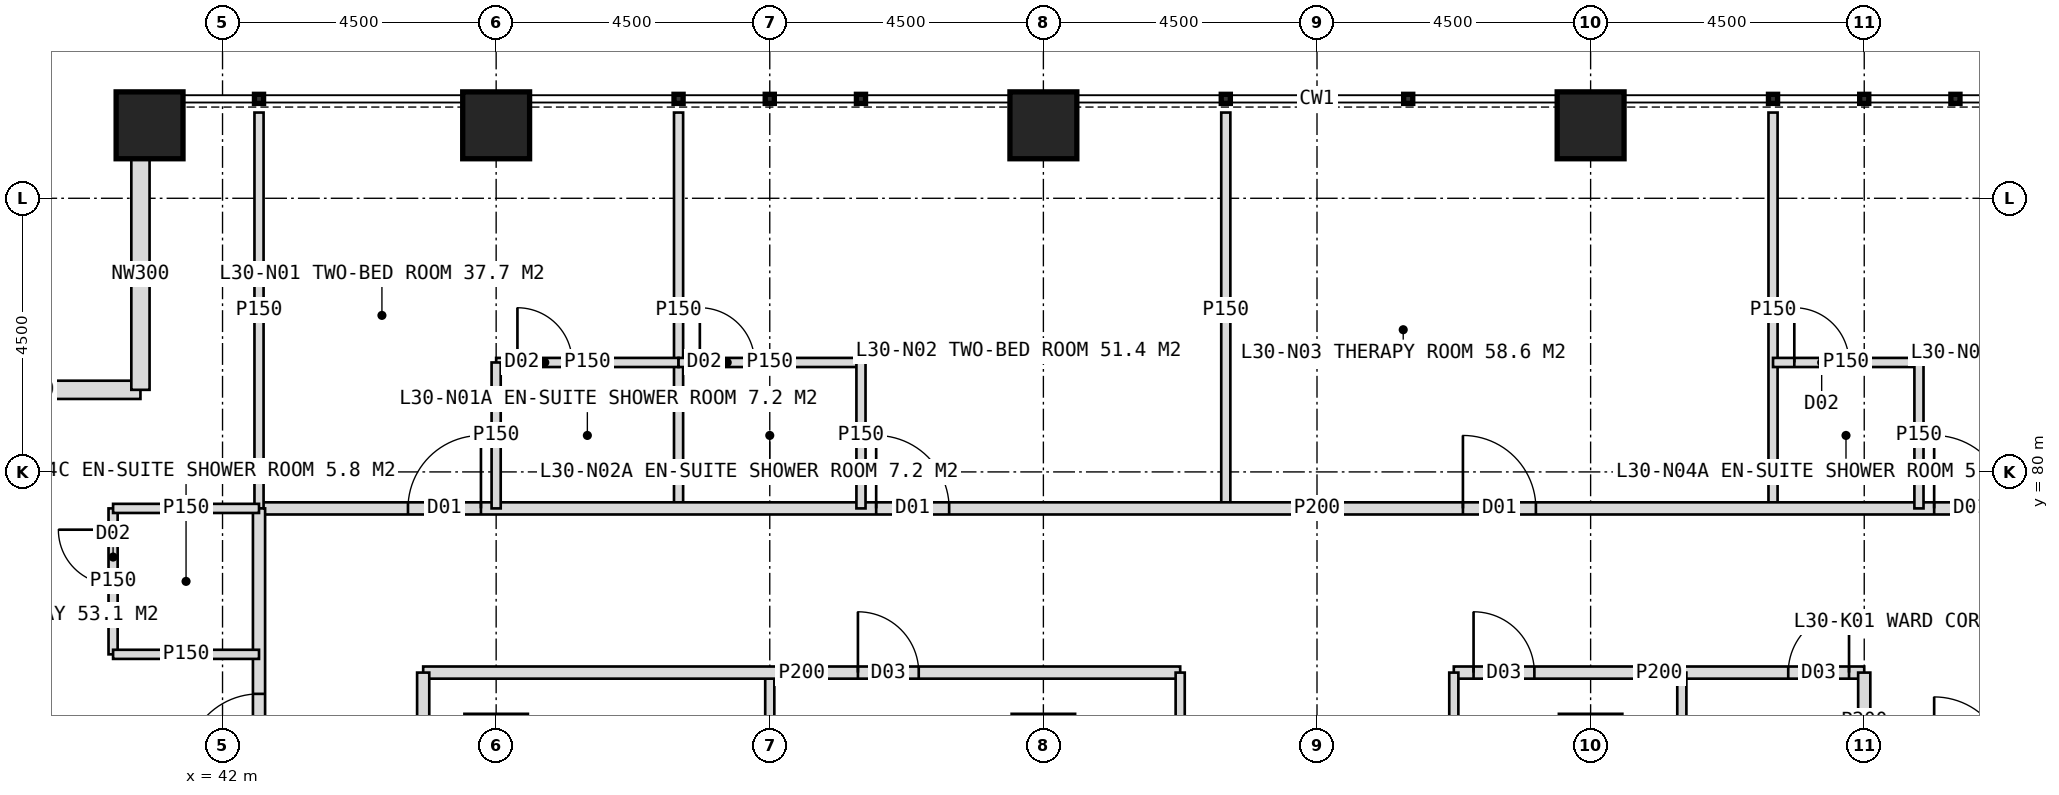
"""IFC4 building model, lengths in metres.
Left out: names, types, materials, properties, quantities, classifications, styles, units other than length and angle.
Written with IfcOpenShell. Run it as: python <this file> out.ifc"""

import sys

from ifc_helpers import new_model, si_unit, direction, frame, frame_2d, origin, origin_2d, place, context, subcontext, project, spatial, rectangle, hollow_rectangle, extrude, element, fill, save


model = new_model("IFC4")
c1 = context("Model", 3, precision=1e-05, world=origin(), true_north=direction((0.0, 1.0)))
c2 = subcontext(c1, "Body", "Model", "MODEL_VIEW")
j1 = project(units=[si_unit("LENGTHUNIT", "METRE"), si_unit("PLANEANGLEUNIT", "RADIAN")], contexts=[c1])
p1 = place(None, origin())
s1 = spatial("IfcSite", under=j1, at=p1, CompositionType="ELEMENT")
p2 = place(p1, origin())
s2 = spatial("IfcBuilding", under=s1, at=p2, CompositionType="ELEMENT")
p3 = place(p2, frame((0.0, 0.0, 128.0)))
s3 = spatial("IfcBuildingStorey", under=s2, at=p3, CompositionType="ELEMENT", Elevation=128.0)
for number, where, z_axis, x_axis in (
    (1, (40.8, 85.7, 0.0), (0.0, 0.0, 1.0), (1.0, 0.0, 0.0)),
    (2, (46.5, 85.7, 0.0), (0.0, 0.0, 1.0), (1.0, 0.0, 0.0)),
    (3, (55.5, 85.7, 0.0), (0.0, 0.0, 1.0), (1.0, 0.0, 0.0)),
    (4, (64.5, 85.7, 0.0), (0.0, 0.0, 1.0), (1.0, 0.0, 0.0)),
):
    element("IfcColumn", number, at=place(p3, frame(where, z_axis=z_axis, x_axis=x_axis)), inside=s3, PredefinedType="COLUMN", context=c2, shape_type="SweptSolid", body=[
        extrude(hollow_rectangle(XDim=1.1, YDim=1.1, WallThickness=0.1, at=origin_2d()), origin(), (0.0, 0.0, 1.0), 4.0),
    ])
for number, where, z_axis, x_axis in (
    (5, (36.85, 81.35, 0.0), (0.0, 0.0, 1.0), (1.0, 0.0, 0.0)),
    (6, (40.65, 81.35, 0.0), (0.0, 0.0, 1.0), (0.0, 1.0, 0.0)),
):
    element("IfcWall", number, at=place(p3, frame(where, z_axis=z_axis, x_axis=x_axis)), inside=s3, PredefinedType="ELEMENTEDWALL", context=c2, shape_type="SweptSolid", body=[
        extrude(rectangle(XDim=3.8, YDim=0.3, at=frame_2d((1.9, 0.0))), origin(), (0.0, 0.0, 1.0), 4.0),
    ])
for number, where, z_axis, x_axis in (
    (7, (49.5, 79.4, 0.0), (0.0, 0.0, 1.0), (0.0, 1.0, 0.0)),
    (8, (58.5, 79.4, 0.0), (0.0, 0.0, 1.0), (0.0, 1.0, 0.0)),
    (9, (67.5, 79.4, 0.0), (0.0, 0.0, 1.0), (0.0, 1.0, 0.0)),
):
    element("IfcWall", number, at=place(p3, frame(where, z_axis=z_axis, x_axis=x_axis)), inside=s3, PredefinedType="PARTITIONING", context=c2, shape_type="SweptSolid", body=[
        extrude(rectangle(XDim=6.51, YDim=0.15, at=frame_2d((3.255, 0.0))), origin(), (0.0, 0.0, 1.0), 3.75),
    ])
p4 = place(p3, frame((42.6, 79.4, 0.0), z_axis=(0.0, 0.0, 1.0), x_axis=(1.0, 0.0, 0.0)))
e10 = element("IfcWall", 10, at=p4, inside=s3, PredefinedType="PARTITIONING", context=c2, shape_type="SweptSolid", body=[
    extrude(rectangle(XDim=34.8, YDim=0.2, at=frame_2d((17.4, 0.0))), origin(), (0.0, 0.0, 1.0), 3.75),
])
p5 = place(p4, frame((2.45, 0.0, 0.0)))
e11 = element("IfcOpeningElement", 11, at=p5, cuts=e10, PredefinedType="OPENING", context=c2, shape_type="SweptSolid", body=[
    extrude(rectangle(XDim=1.2, YDim=2.2, at=frame_2d((0.6, 1.1))), frame((0.0, 0.11, 0.0), z_axis=(0.0, -1.0, 0.0), x_axis=(1.0, 0.0, 0.0)), (0.0, 0.0, 1.0), 0.22),
])
p6 = place(p4, frame((10.15, 0.0, 0.0)))
e12 = element("IfcOpeningElement", 12, at=p6, cuts=e10, PredefinedType="OPENING", context=c2, shape_type="SweptSolid", body=[
    extrude(rectangle(XDim=1.2, YDim=2.2, at=frame_2d((0.6, 1.1))), frame((0.0, 0.11, 0.0), z_axis=(0.0, -1.0, 0.0), x_axis=(1.0, 0.0, 0.0)), (0.0, 0.0, 1.0), 0.22),
])
p7 = place(p4, frame((19.8, 0.0, 0.0)))
e13 = element("IfcOpeningElement", 13, at=p7, cuts=e10, PredefinedType="OPENING", context=c2, shape_type="SweptSolid", body=[
    extrude(rectangle(XDim=1.2, YDim=2.2, at=frame_2d((0.6, 1.1))), frame((0.0, 0.11, 0.0), z_axis=(0.0, -1.0, 0.0), x_axis=(1.0, 0.0, 0.0)), (0.0, 0.0, 1.0), 0.22),
])
p8 = place(p4, frame((27.55, 0.0, 0.0)))
e14 = element("IfcOpeningElement", 14, at=p8, cuts=e10, PredefinedType="OPENING", context=c2, shape_type="SweptSolid", body=[
    extrude(rectangle(XDim=1.2, YDim=2.2, at=frame_2d((0.6, 1.1))), frame((0.0, 0.11, 0.0), z_axis=(0.0, -1.0, 0.0), x_axis=(1.0, 0.0, 0.0)), (0.0, 0.0, 1.0), 0.22),
])
p9 = place(p3, frame((42.6, 79.4, 0.0), z_axis=(0.0, 0.0, 1.0), x_axis=(0.0, 1.0, 0.0)))
e15 = element("IfcWall", 15, at=p9, inside=s3, PredefinedType="PARTITIONING", context=c2, shape_type="SweptSolid", body=[
    extrude(rectangle(XDim=6.51, YDim=0.15, at=frame_2d((3.255, 0.0))), origin(), (0.0, 0.0, 1.0), 3.75),
])
p10 = place(p3, frame((46.5, 81.8, 0.0), z_axis=(0.0, 0.0, 1.0), x_axis=(1.0, 0.0, 0.0)))
e16 = element("IfcWall", 16, at=p10, inside=s3, PredefinedType="PARTITIONING", context=c2, shape_type="SweptSolid", body=[
    extrude(rectangle(XDim=3.0, YDim=0.15, at=frame_2d((1.5, 0.0))), origin(), (0.0, 0.0, 1.0), 3.75),
])
p11 = place(p10, frame((0.35, 0.0, 0.0)))
e17 = element("IfcOpeningElement", 17, at=p11, cuts=e16, PredefinedType="OPENING", context=c2, shape_type="SweptSolid", body=[
    extrude(rectangle(XDim=0.9, YDim=2.1, at=frame_2d((0.45, 1.05))), frame((0.0, 0.085, 0.0), z_axis=(0.0, -1.0, 0.0), x_axis=(1.0, 0.0, 0.0)), (0.0, 0.0, 1.0), 0.17),
])
p12 = place(p3, frame((46.5, 79.4, 0.0), z_axis=(0.0, 0.0, 1.0), x_axis=(0.0, 1.0, 0.0)))
e18 = element("IfcWall", 18, at=p12, inside=s3, PredefinedType="PARTITIONING", context=c2, shape_type="SweptSolid", body=[
    extrude(rectangle(XDim=2.4, YDim=0.15, at=frame_2d((1.2, 0.0))), origin(), (0.0, 0.0, 1.0), 2.95),
])
p13 = place(p3, frame((49.5, 81.8, 0.0), z_axis=(0.0, 0.0, 1.0), x_axis=(1.0, 0.0, 0.0)))
e19 = element("IfcWall", 19, at=p13, inside=s3, PredefinedType="PARTITIONING", context=c2, shape_type="SweptSolid", body=[
    extrude(rectangle(XDim=3.0, YDim=0.15, at=frame_2d((1.5, 0.0))), origin(), (0.0, 0.0, 1.0), 3.75),
])
p14 = place(p13, frame((0.35, 0.0, 0.0)))
e20 = element("IfcOpeningElement", 20, at=p14, cuts=e19, PredefinedType="OPENING", context=c2, shape_type="SweptSolid", body=[
    extrude(rectangle(XDim=0.9, YDim=2.1, at=frame_2d((0.45, 1.05))), frame((0.0, 0.085, 0.0), z_axis=(0.0, -1.0, 0.0), x_axis=(1.0, 0.0, 0.0)), (0.0, 0.0, 1.0), 0.17),
])
p15 = place(p3, frame((52.5, 79.4, 0.0), z_axis=(0.0, 0.0, 1.0), x_axis=(0.0, 1.0, 0.0)))
e21 = element("IfcWall", 21, at=p15, inside=s3, PredefinedType="PARTITIONING", context=c2, shape_type="SweptSolid", body=[
    extrude(rectangle(XDim=2.4, YDim=0.15, at=frame_2d((1.2, 0.0))), origin(), (0.0, 0.0, 1.0), 3.75),
])
p16 = place(p3, frame((67.5, 81.8, 0.0), z_axis=(0.0, 0.0, 1.0), x_axis=(1.0, 0.0, 0.0)))
e22 = element("IfcWall", 22, at=p16, inside=s3, PredefinedType="PARTITIONING", context=c2, shape_type="SweptSolid", body=[
    extrude(rectangle(XDim=2.4, YDim=0.15, at=frame_2d((1.2, 0.0))), origin(), (0.0, 0.0, 1.0), 3.75),
])
p17 = place(p16, frame((0.35, 0.0, 0.0)))
e23 = element("IfcOpeningElement", 23, at=p17, cuts=e22, PredefinedType="OPENING", context=c2, shape_type="SweptSolid", body=[
    extrude(rectangle(XDim=0.9, YDim=2.1, at=frame_2d((0.45, 1.05))), frame((0.0, 0.085, 0.0), z_axis=(0.0, -1.0, 0.0), x_axis=(1.0, 0.0, 0.0)), (0.0, 0.0, 1.0), 0.17),
])
p18 = place(p3, frame((69.9, 79.4, 0.0), z_axis=(0.0, 0.0, 1.0), x_axis=(0.0, 1.0, 0.0)))
e24 = element("IfcWall", 24, at=p18, inside=s3, PredefinedType="PARTITIONING", context=c2, shape_type="SweptSolid", body=[
    extrude(rectangle(XDim=2.4, YDim=0.15, at=frame_2d((1.2, 0.0))), origin(), (0.0, 0.0, 1.0), 3.75),
])
p19 = place(p3, frame((51.0, 71.0, 0.0), z_axis=(0.0, 0.0, 1.0), x_axis=(0.0, 1.0, 0.0)))
e25 = element("IfcWall", 25, at=p19, inside=s3, PredefinedType="PARTITIONING", context=c2, shape_type="SweptSolid", body=[
    extrude(rectangle(XDim=5.7, YDim=0.15, at=frame_2d((2.85, 0.0))), origin(), (0.0, 0.0, 1.0), 3.75),
])
p20 = place(p3, frame((45.3, 76.7, 0.0), z_axis=(0.0, 0.0, 1.0), x_axis=(1.0, 0.0, 0.0)))
e26 = element("IfcWall", 26, at=p20, inside=s3, PredefinedType="PARTITIONING", context=c2, shape_type="SweptSolid", body=[
    extrude(rectangle(XDim=12.45, YDim=0.2, at=frame_2d((6.225, 0.0))), origin(), (0.0, 0.0, 1.0), 3.75),
])
p21 = place(p20, frame((7.15, 0.0, 0.0)))
e27 = element("IfcOpeningElement", 27, at=p21, cuts=e26, PredefinedType="OPENING", context=c2, shape_type="SweptSolid", body=[
    extrude(rectangle(XDim=1.0, YDim=2.1, at=frame_2d((0.5, 1.05))), frame((0.0, 0.11, 0.0), z_axis=(0.0, -1.0, 0.0), x_axis=(1.0, 0.0, 0.0)), (0.0, 0.0, 1.0), 0.22),
])
p22 = place(p3, frame((62.25, 76.7, 0.0), z_axis=(0.0, 0.0, 1.0), x_axis=(1.0, 0.0, 0.0)))
e28 = element("IfcWall", 28, at=p22, inside=s3, PredefinedType="PARTITIONING", context=c2, shape_type="SweptSolid", body=[
    extrude(rectangle(XDim=6.75, YDim=0.2, at=frame_2d((3.375, 0.0))), origin(), (0.0, 0.0, 1.0), 3.75),
])
p23 = place(p22, frame((0.325, 0.0, 0.0)))
e29 = element("IfcOpeningElement", 29, at=p23, cuts=e28, PredefinedType="OPENING", context=c2, shape_type="SweptSolid", body=[
    extrude(rectangle(XDim=1.0, YDim=2.1, at=frame_2d((0.5, 1.05))), frame((0.0, 0.11, 0.0), z_axis=(0.0, -1.0, 0.0), x_axis=(1.0, 0.0, 0.0)), (0.0, 0.0, 1.0), 0.22),
])
p24 = place(p22, frame((5.5, 0.0, 0.0)))
e30 = element("IfcOpeningElement", 30, at=p24, cuts=e28, PredefinedType="OPENING", context=c2, shape_type="SweptSolid", body=[
    extrude(rectangle(XDim=1.0, YDim=2.1, at=frame_2d((0.5, 1.05))), frame((0.0, 0.11, 0.0), z_axis=(0.0, -1.0, 0.0), x_axis=(1.0, 0.0, 0.0)), (0.0, 0.0, 1.0), 0.22),
])
p25 = place(p3, frame((57.75, 71.0, 0.0), z_axis=(0.0, 0.0, 1.0), x_axis=(0.0, 1.0, 0.0)))
e31 = element("IfcWall", 31, at=p25, inside=s3, PredefinedType="PARTITIONING", context=c2, shape_type="SweptSolid", body=[
    extrude(rectangle(XDim=5.7, YDim=0.15, at=frame_2d((2.85, 0.0))), origin(), (0.0, 0.0, 1.0), 3.75),
])
p26 = place(p25, frame((0.6, 0.0, 0.0)))
e32 = element("IfcOpeningElement", 32, at=p26, cuts=e31, PredefinedType="OPENING", context=c2, shape_type="SweptSolid", body=[
    extrude(rectangle(XDim=0.9, YDim=2.1, at=frame_2d((0.45, 1.05))), frame((0.0, 0.085, 0.0), z_axis=(0.0, -1.0, 0.0), x_axis=(1.0, 0.0, 0.0)), (0.0, 0.0, 1.0), 0.17),
])
p27 = place(p3, frame((62.25, 71.0, 0.0), z_axis=(0.0, 0.0, 1.0), x_axis=(0.0, 1.0, 0.0)))
e33 = element("IfcWall", 33, at=p27, inside=s3, PredefinedType="PARTITIONING", context=c2, shape_type="SweptSolid", body=[
    extrude(rectangle(XDim=5.7, YDim=0.15, at=frame_2d((2.85, 0.0))), origin(), (0.0, 0.0, 1.0), 3.75),
])
p28 = place(p27, frame((0.6, 0.0, 0.0)))
e34 = element("IfcOpeningElement", 34, at=p28, cuts=e33, PredefinedType="OPENING", context=c2, shape_type="SweptSolid", body=[
    extrude(rectangle(XDim=0.9, YDim=2.1, at=frame_2d((0.45, 1.05))), frame((0.0, 0.085, 0.0), z_axis=(0.0, -1.0, 0.0), x_axis=(1.0, 0.0, 0.0)), (0.0, 0.0, 1.0), 0.17),
])
p29 = place(p3, frame((66.0, 71.0, 0.0), z_axis=(0.0, 0.0, 1.0), x_axis=(0.0, 1.0, 0.0)))
e35 = element("IfcWall", 35, at=p29, inside=s3, PredefinedType="PARTITIONING", context=c2, shape_type="SweptSolid", body=[
    extrude(rectangle(XDim=5.7, YDim=0.15, at=frame_2d((2.85, 0.0))), origin(), (0.0, 0.0, 1.0), 3.75),
])
p30 = place(p3, frame((42.6, 44.6, 0.0), z_axis=(0.0, 0.0, 1.0), x_axis=(0.0, 1.0, 0.0)))
e36 = element("IfcWall", 36, at=p30, inside=s3, PredefinedType="PARTITIONING", context=c2, shape_type="SweptSolid", body=[
    extrude(rectangle(XDim=34.8, YDim=0.2, at=frame_2d((17.4, 0.0))), origin(), (0.0, 0.0, 1.0), 3.75),
])
p31 = place(p30, frame((2.45, 0.0, 0.0)))
e37 = element("IfcOpeningElement", 37, at=p31, cuts=e36, PredefinedType="OPENING", context=c2, shape_type="SweptSolid", body=[
    extrude(rectangle(XDim=1.2, YDim=2.2, at=frame_2d((0.6, 1.1))), frame((0.0, 0.11, 0.0), z_axis=(0.0, -1.0, 0.0), x_axis=(1.0, 0.0, 0.0)), (0.0, 0.0, 1.0), 0.22),
])
p32 = place(p30, frame((10.15, 0.0, 0.0)))
e38 = element("IfcOpeningElement", 38, at=p32, cuts=e36, PredefinedType="OPENING", context=c2, shape_type="SweptSolid", body=[
    extrude(rectangle(XDim=1.2, YDim=2.2, at=frame_2d((0.6, 1.1))), frame((0.0, 0.11, 0.0), z_axis=(0.0, -1.0, 0.0), x_axis=(1.0, 0.0, 0.0)), (0.0, 0.0, 1.0), 0.22),
])
p33 = place(p30, frame((23.45, 0.0, 0.0)))
e39 = element("IfcOpeningElement", 39, at=p33, cuts=e36, PredefinedType="OPENING", context=c2, shape_type="SweptSolid", body=[
    extrude(rectangle(XDim=1.2, YDim=2.2, at=frame_2d((0.6, 1.1))), frame((0.0, 0.11, 0.0), z_axis=(0.0, -1.0, 0.0), x_axis=(1.0, 0.0, 0.0)), (0.0, 0.0, 1.0), 0.22),
])
p34 = place(p30, frame((30.55, 0.0, 0.0)))
e40 = element("IfcOpeningElement", 40, at=p34, cuts=e36, PredefinedType="OPENING", context=c2, shape_type="SweptSolid", body=[
    extrude(rectangle(XDim=1.2, YDim=2.2, at=frame_2d((0.6, 1.1))), frame((0.0, 0.11, 0.0), z_axis=(0.0, -1.0, 0.0), x_axis=(1.0, 0.0, 0.0)), (0.0, 0.0, 1.0), 0.22),
])
p35 = place(p3, frame((40.2, 77.0, 0.0), z_axis=(0.0, 0.0, 1.0), x_axis=(0.0, 1.0, 0.0)))
e41 = element("IfcWall", 41, at=p35, inside=s3, PredefinedType="PARTITIONING", context=c2, shape_type="SweptSolid", body=[
    extrude(rectangle(XDim=2.4, YDim=0.15, at=frame_2d((1.2, 0.0))), origin(), (0.0, 0.0, 1.0), 3.75),
])
p36 = place(p35, frame((1.15, 0.0, 0.0)))
e42 = element("IfcOpeningElement", 42, at=p36, cuts=e41, PredefinedType="OPENING", context=c2, shape_type="SweptSolid", body=[
    extrude(rectangle(XDim=0.9, YDim=2.1, at=frame_2d((0.45, 1.05))), frame((0.0, 0.085, 0.0), z_axis=(0.0, -1.0, 0.0), x_axis=(1.0, 0.0, 0.0)), (0.0, 0.0, 1.0), 0.17),
])
for number, where, z_axis, x_axis in (
    (43, (42.6, 77.0, 0.0), (0.0, 0.0, 1.0), (-1.0, 0.0, 0.0)),
    (44, (42.6, 79.4, 0.0), (0.0, 0.0, 1.0), (-1.0, 0.0, 0.0)),
):
    element("IfcWall", number, at=place(p3, frame(where, z_axis=z_axis, x_axis=x_axis)), inside=s3, PredefinedType="PARTITIONING", context=c2, shape_type="SweptSolid", body=[
        extrude(rectangle(XDim=2.4, YDim=0.15, at=frame_2d((1.2, 0.0))), origin(), (0.0, 0.0, 1.0), 3.75),
    ])
p37 = place(p3, frame((45.3, 62.0, 0.0), z_axis=(0.0, 0.0, 1.0), x_axis=(0.0, 1.0, 0.0)))
e45 = element("IfcWall", 45, at=p37, inside=s3, PredefinedType="PARTITIONING", context=c2, shape_type="SweptSolid", body=[
    extrude(rectangle(XDim=14.7, YDim=0.2, at=frame_2d((7.35, 0.0))), origin(), (0.0, 0.0, 1.0), 3.75),
])
p38 = place(p37, frame((1.45, 0.0, 0.0)))
e46 = element("IfcOpeningElement", 46, at=p38, cuts=e45, PredefinedType="OPENING", context=c2, shape_type="SweptSolid", body=[
    extrude(rectangle(XDim=1.0, YDim=2.1, at=frame_2d((0.5, 1.05))), frame((0.0, 0.11, 0.0), z_axis=(0.0, -1.0, 0.0), x_axis=(1.0, 0.0, 0.0)), (0.0, 0.0, 1.0), 0.22),
])
p39 = place(p37, frame((11.35, 0.0, 0.0)))
e47 = element("IfcOpeningElement", 47, at=p39, cuts=e45, PredefinedType="OPENING", context=c2, shape_type="SweptSolid", body=[
    extrude(rectangle(XDim=1.0, YDim=2.1, at=frame_2d((0.5, 1.05))), frame((0.0, 0.11, 0.0), z_axis=(0.0, -1.0, 0.0), x_axis=(1.0, 0.0, 0.0)), (0.0, 0.0, 1.0), 0.22),
])
p40 = place(p3, frame((69.0, 75.1, 0.0), z_axis=(0.0, 0.0, 1.0), x_axis=(0.0, 1.0, 0.0)))
e48 = element("IfcWall", 48, at=p40, inside=s3, PredefinedType="PARTITIONING", context=c2, shape_type="SweptSolid", body=[
    extrude(rectangle(XDim=1.6, YDim=0.2, at=frame_2d((0.8, 0.0))), origin(), (0.0, 0.0, 1.0), 3.75),
])
p41 = place(p5, origin())
e49 = element("IfcDoor", 49, at=p41, inside=s3, OperationType="SINGLE_SWING_RIGHT", PredefinedType="DOOR", context=c2, shape_type="SweptSolid", body=[
    extrude(rectangle(XDim=1.2, YDim=2.2, at=frame_2d((0.6, 1.1))), frame((0.0, 0.025, 0.0), z_axis=(0.0, -1.0, 0.0), x_axis=(1.0, 0.0, 0.0)), (0.0, 0.0, 1.0), 0.05),
])
fill(e11, e49)
p42 = place(p11, origin())
e50 = element("IfcDoor", 50, at=p42, inside=s3, OperationType="SINGLE_SWING_LEFT", PredefinedType="DOOR", context=c2, shape_type="SweptSolid", body=[
    extrude(rectangle(XDim=0.9, YDim=2.1, at=frame_2d((0.45, 1.05))), frame((0.0, 0.025, 0.0), z_axis=(0.0, -1.0, 0.0), x_axis=(1.0, 0.0, 0.0)), (0.0, 0.0, 1.0), 0.05),
])
fill(e17, e50)
p43 = place(p6, origin())
e51 = element("IfcDoor", 51, at=p43, inside=s3, OperationType="SINGLE_SWING_LEFT", PredefinedType="DOOR", context=c2, shape_type="SweptSolid", body=[
    extrude(rectangle(XDim=1.2, YDim=2.2, at=frame_2d((0.6, 1.1))), frame((0.0, 0.025, 0.0), z_axis=(0.0, -1.0, 0.0), x_axis=(1.0, 0.0, 0.0)), (0.0, 0.0, 1.0), 0.05),
])
fill(e12, e51)
p44 = place(p14, origin())
e52 = element("IfcDoor", 52, at=p44, inside=s3, OperationType="SINGLE_SWING_LEFT", PredefinedType="DOOR", context=c2, shape_type="SweptSolid", body=[
    extrude(rectangle(XDim=0.9, YDim=2.1, at=frame_2d((0.45, 1.05))), frame((0.0, 0.025, 0.0), z_axis=(0.0, -1.0, 0.0), x_axis=(1.0, 0.0, 0.0)), (0.0, 0.0, 1.0), 0.05),
])
fill(e20, e52)
p45 = place(p7, origin())
e53 = element("IfcDoor", 53, at=p45, inside=s3, OperationType="SINGLE_SWING_LEFT", PredefinedType="DOOR", context=c2, shape_type="SweptSolid", body=[
    extrude(rectangle(XDim=1.2, YDim=2.2, at=frame_2d((0.6, 1.1))), frame((0.0, 0.025, 0.0), z_axis=(0.0, -1.0, 0.0), x_axis=(1.0, 0.0, 0.0)), (0.0, 0.0, 1.0), 0.05),
])
fill(e13, e53)
p46 = place(p8, origin())
e54 = element("IfcDoor", 54, at=p46, inside=s3, OperationType="SINGLE_SWING_LEFT", PredefinedType="DOOR", context=c2, shape_type="SweptSolid", body=[
    extrude(rectangle(XDim=1.2, YDim=2.2, at=frame_2d((0.6, 1.1))), frame((0.0, 0.025, 0.0), z_axis=(0.0, -1.0, 0.0), x_axis=(1.0, 0.0, 0.0)), (0.0, 0.0, 1.0), 0.05),
])
fill(e14, e54)
p47 = place(p17, origin())
e55 = element("IfcDoor", 55, at=p47, inside=s3, OperationType="SINGLE_SWING_LEFT", PredefinedType="DOOR", context=c2, shape_type="SweptSolid", body=[
    extrude(rectangle(XDim=0.9, YDim=2.1, at=frame_2d((0.45, 1.05))), frame((0.0, 0.025, 0.0), z_axis=(0.0, -1.0, 0.0), x_axis=(1.0, 0.0, 0.0)), (0.0, 0.0, 1.0), 0.05),
])
fill(e23, e55)
p48 = place(p21, origin())
e56 = element("IfcDoor", 56, at=p48, inside=s3, OperationType="SINGLE_SWING_LEFT", PredefinedType="DOOR", context=c2, shape_type="SweptSolid", body=[
    extrude(rectangle(XDim=1.0, YDim=2.1, at=frame_2d((0.5, 1.05))), frame((0.0, 0.025, 0.0), z_axis=(0.0, -1.0, 0.0), x_axis=(1.0, 0.0, 0.0)), (0.0, 0.0, 1.0), 0.05),
])
fill(e27, e56)
p49 = place(p23, origin())
e57 = element("IfcDoor", 57, at=p49, inside=s3, OperationType="SINGLE_SWING_LEFT", PredefinedType="DOOR", context=c2, shape_type="SweptSolid", body=[
    extrude(rectangle(XDim=1.0, YDim=2.1, at=frame_2d((0.5, 1.05))), frame((0.0, 0.025, 0.0), z_axis=(0.0, -1.0, 0.0), x_axis=(1.0, 0.0, 0.0)), (0.0, 0.0, 1.0), 0.05),
])
fill(e29, e57)
p50 = place(p24, origin())
e58 = element("IfcDoor", 58, at=p50, inside=s3, OperationType="SINGLE_SWING_RIGHT", PredefinedType="DOOR", context=c2, shape_type="SweptSolid", body=[
    extrude(rectangle(XDim=1.0, YDim=2.1, at=frame_2d((0.5, 1.05))), frame((0.0, 0.025, 0.0), z_axis=(0.0, -1.0, 0.0), x_axis=(1.0, 0.0, 0.0)), (0.0, 0.0, 1.0), 0.05),
])
fill(e30, e58)
p51 = place(p34, origin())
e59 = element("IfcDoor", 59, at=p51, inside=s3, OperationType="SINGLE_SWING_LEFT", PredefinedType="DOOR", context=c2, shape_type="SweptSolid", body=[
    extrude(rectangle(XDim=1.2, YDim=2.2, at=frame_2d((0.6, 1.1))), frame((0.0, 0.025, 0.0), z_axis=(0.0, -1.0, 0.0), x_axis=(1.0, 0.0, 0.0)), (0.0, 0.0, 1.0), 0.05),
])
fill(e40, e59)
p52 = place(p36, origin())
e60 = element("IfcDoor", 60, at=p52, inside=s3, OperationType="SINGLE_SWING_RIGHT", PredefinedType="DOOR", context=c2, shape_type="SweptSolid", body=[
    extrude(rectangle(XDim=0.9, YDim=2.1, at=frame_2d((0.45, 1.05))), frame((0.0, 0.025, 0.0), z_axis=(0.0, -1.0, 0.0), x_axis=(1.0, 0.0, 0.0)), (0.0, 0.0, 1.0), 0.05),
])
fill(e42, e60)
save(model, sys.argv[1])
